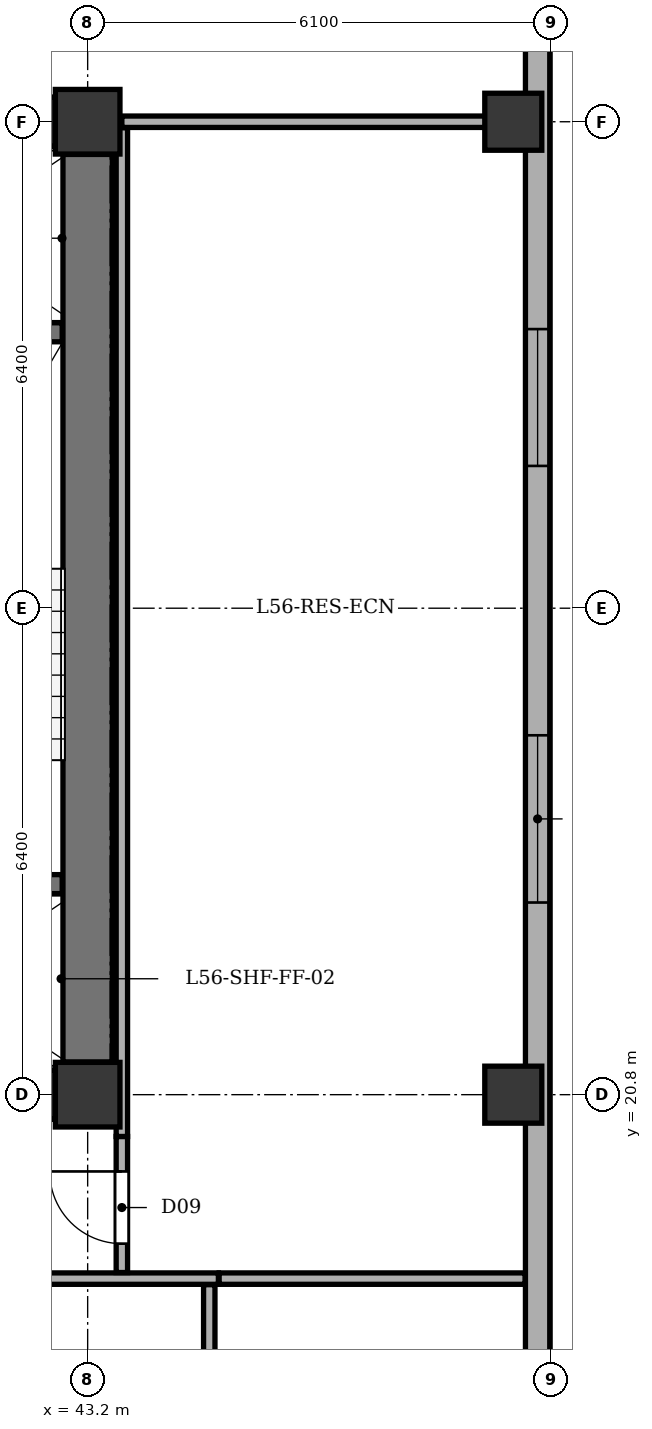
"""IFC4 building model, lengths in metres.
Left out: names, types, materials, properties, quantities, classifications, styles, units other than length and angle.
Written with IfcOpenShell. Run it as: python <this file> out.ifc"""

import sys

from ifc_helpers import new_model, si_unit, direction, frame, frame_2d, origin, origin_2d, place, context, subcontext, project, spatial, rectangle, extrude, element, fill, save


model = new_model("IFC4")
c1 = context("Model", 3, precision=1e-05, world=origin(), true_north=direction((0.0, 1.0)))
c2 = subcontext(c1, "Body", "Model", "MODEL_VIEW")
j1 = project(units=[si_unit("LENGTHUNIT", "METRE"), si_unit("PLANEANGLEUNIT", "RADIAN")], contexts=[c1])
p1 = place(None, origin())
s1 = spatial("IfcSite", under=j1, at=p1, CompositionType="ELEMENT")
p2 = place(p1, origin())
s2 = spatial("IfcBuilding", under=s1, at=p2, CompositionType="ELEMENT")
p3 = place(p2, frame((0.0, 0.0, 217.7)))
s3 = spatial("IfcBuildingStorey", under=s2, at=p3, CompositionType="ELEMENT", Elevation=217.7)
for number, where, z_axis, x_axis in (
    (1, (43.2, 20.8, 0.0), (0.0, 0.0, 1.0), (1.0, 0.0, 0.0)),
    (2, (43.2, 33.6, 0.0), (0.0, 0.0, 1.0), (1.0, 0.0, 0.0)),
):
    element("IfcColumn", number, at=place(p3, frame(where, z_axis=z_axis, x_axis=x_axis)), inside=s3, PredefinedType="COLUMN", context=c2, shape_type="SweptSolid", body=[
        extrude(rectangle(XDim=0.85, YDim=0.85, at=origin_2d()), origin(), (0.0, 0.0, 1.0), 3.4),
    ])
for number, where, z_axis, x_axis in (
    (3, (48.8, 20.8, 0.0), (0.0, 0.0, 1.0), (1.0, 0.0, 0.0)),
    (4, (48.8, 33.6, 0.0), (0.0, 0.0, 1.0), (1.0, 0.0, 0.0)),
):
    element("IfcColumn", number, at=place(p3, frame(where, z_axis=z_axis, x_axis=x_axis)), inside=s3, PredefinedType="COLUMN", context=c2, shape_type="SweptSolid", body=[
        extrude(rectangle(XDim=0.75, YDim=0.75, at=origin_2d()), origin(), (0.0, 0.0, 1.0), 3.4),
    ])
p4 = place(p3, frame((49.12, 35.0, 0.0), z_axis=(0.0, 0.0, 1.0), x_axis=(0.0, -1.0, 0.0)))
e5 = element("IfcWall", 5, at=p4, inside=s3, PredefinedType="STANDARD", context=c2, shape_type="SweptSolid", body=[
    extrude(rectangle(XDim=27.8, YDim=0.32, at=frame_2d((13.9, 0.0))), origin(), (0.0, 0.0, 1.0), 2.725),
])
p5 = place(p4, frame((4.128, 0.0, 0.75)))
e6 = element("IfcOpeningElement", 6, at=p5, cuts=e5, PredefinedType="OPENING", context=c2, shape_type="SweptSolid", body=[
    extrude(rectangle(XDim=1.8, YDim=1.7, at=frame_2d((0.9, 0.85))), frame((0.0, 0.17, 0.0), z_axis=(0.0, -1.0, 0.0), x_axis=(1.0, 0.0, 0.0)), (0.0, 0.0, 1.0), 0.34),
])
p6 = place(p4, frame((9.472, 0.0, 0.75)))
e7 = element("IfcOpeningElement", 7, at=p6, cuts=e5, PredefinedType="OPENING", context=c2, shape_type="SweptSolid", body=[
    extrude(rectangle(XDim=2.2, YDim=1.7, at=frame_2d((1.1, 0.85))), frame((0.0, 0.17, 0.0), z_axis=(0.0, -1.0, 0.0), x_axis=(1.0, 0.0, 0.0)), (0.0, 0.0, 1.0), 0.34),
])
p7 = place(p4, frame((18.815, 0.0, 0.75)))
e8 = element("IfcOpeningElement", 8, at=p7, cuts=e5, PredefinedType="OPENING", context=c2, shape_type="SweptSolid", body=[
    extrude(rectangle(XDim=1.8, YDim=1.7, at=frame_2d((0.9, 0.85))), frame((0.0, 0.17, 0.0), z_axis=(0.0, -1.0, 0.0), x_axis=(1.0, 0.0, 0.0)), (0.0, 0.0, 1.0), 0.34),
])
p8 = place(p4, frame((23.405, 0.0, 0.75)))
e9 = element("IfcOpeningElement", 9, at=p8, cuts=e5, PredefinedType="OPENING", context=c2, shape_type="SweptSolid", body=[
    extrude(rectangle(XDim=2.2, YDim=1.7, at=frame_2d((1.1, 0.85))), frame((0.0, 0.17, 0.0), z_axis=(0.0, -1.0, 0.0), x_axis=(1.0, 0.0, 0.0)), (0.0, 0.0, 1.0), 0.34),
])
p9 = place(p3, frame((43.2, 21.23, 0.0), z_axis=(0.0, 0.0, 1.0), x_axis=(0.0, 1.0, 0.0)))
e10 = element("IfcWall", 10, at=p9, inside=s3, PredefinedType="SHEAR", context=c2, shape_type="SweptSolid", body=[
    extrude(rectangle(XDim=11.94, YDim=0.65, at=frame_2d((5.97, 0.0))), origin(), (0.0, 0.0, 1.0), 3.1),
])
p10 = place(p3, frame((35.63, 20.8, 0.0), z_axis=(0.0, 0.0, 1.0), x_axis=(1.0, 0.0, 0.0)))
e11 = element("IfcWall", 11, at=p10, inside=s3, PredefinedType="SHEAR", context=c2, shape_type="SweptSolid", body=[
    extrude(rectangle(XDim=7.14, YDim=0.65, at=frame_2d((3.57, 0.0))), origin(), (0.0, 0.0, 1.0), 3.1),
])
p11 = place(p3, frame((35.63, 33.6, 0.0), z_axis=(0.0, 0.0, 1.0), x_axis=(1.0, 0.0, 0.0)))
e12 = element("IfcWall", 12, at=p11, inside=s3, PredefinedType="SHEAR", context=c2, shape_type="SweptSolid", body=[
    extrude(rectangle(XDim=7.14, YDim=0.65, at=frame_2d((3.57, 0.0))), origin(), (0.0, 0.0, 1.0), 3.1),
])
p12 = place(p11, frame((4.77, 0.0, 0.0)))
e13 = element("IfcOpeningElement", 13, at=p12, cuts=e12, PredefinedType="OPENING", context=c2, shape_type="SweptSolid", body=[
    extrude(rectangle(XDim=1.3, YDim=2.15, at=frame_2d((0.65, 1.075))), frame((0.0, 0.335, 0.0), z_axis=(0.0, -1.0, 0.0), x_axis=(1.0, 0.0, 0.0)), (0.0, 0.0, 1.0), 0.67),
])
p13 = place(p11, frame((2.57, 0.0, 0.0)))
e14 = element("IfcOpeningElement", 14, at=p13, cuts=e12, PredefinedType="OPENING", context=c2, shape_type="SweptSolid", body=[
    extrude(rectangle(XDim=0.85, YDim=2.02, at=frame_2d((0.425, 1.01))), frame((0.0, 0.335, 0.0), z_axis=(0.0, -1.0, 0.0), x_axis=(1.0, 0.0, 0.0)), (0.0, 0.0, 1.0), 0.67),
])
for number, where, z_axis, x_axis in (
    (15, (39.69, 23.57, 0.0), (0.0, 0.0, 1.0), (1.0, 0.0, 0.0)),
    (16, (39.69, 30.83, 0.0), (0.0, 0.0, 1.0), (1.0, 0.0, 0.0)),
):
    element("IfcWall", number, at=place(p3, frame(where, z_axis=z_axis, x_axis=x_axis)), inside=s3, PredefinedType="SHEAR", context=c2, shape_type="SweptSolid", body=[
        extrude(rectangle(XDim=3.175, YDim=0.25, at=frame_2d((1.587, 0.0))), origin(), (0.0, 0.0, 1.0), 3.1),
    ])
p14 = place(p3, frame((10.9, 18.38, 0.0), z_axis=(0.0, 0.0, 1.0), x_axis=(1.0, 0.0, 0.0)))
e17 = element("IfcWall", 17, at=p14, inside=s3, PredefinedType="PARTITIONING", context=c2, shape_type="SweptSolid", body=[
    extrude(rectangle(XDim=34.02, YDim=0.15, at=frame_2d((17.01, 0.0))), origin(), (0.0, 0.0, 1.0), 3.1),
])
p15 = place(p14, frame((3.674, 0.0, 0.0)))
e18 = element("IfcOpeningElement", 18, at=p15, cuts=e17, PredefinedType="OPENING", context=c2, shape_type="SweptSolid", body=[
    extrude(rectangle(XDim=1.0, YDim=2.1, at=frame_2d((0.5, 1.05))), frame((0.0, 0.085, 0.0), z_axis=(0.0, -1.0, 0.0), x_axis=(1.0, 0.0, 0.0)), (0.0, 0.0, 1.0), 0.17),
])
p16 = place(p14, frame((12.118, 0.0, 0.0)))
e19 = element("IfcOpeningElement", 19, at=p16, cuts=e17, PredefinedType="OPENING", context=c2, shape_type="SweptSolid", body=[
    extrude(rectangle(XDim=1.0, YDim=2.1, at=frame_2d((0.5, 1.05))), frame((0.0, 0.085, 0.0), z_axis=(0.0, -1.0, 0.0), x_axis=(1.0, 0.0, 0.0)), (0.0, 0.0, 1.0), 0.17),
])
p17 = place(p14, frame((20.901, 0.0, 0.0)))
e20 = element("IfcOpeningElement", 20, at=p17, cuts=e17, PredefinedType="OPENING", context=c2, shape_type="SweptSolid", body=[
    extrude(rectangle(XDim=1.0, YDim=2.1, at=frame_2d((0.5, 1.05))), frame((0.0, 0.085, 0.0), z_axis=(0.0, -1.0, 0.0), x_axis=(1.0, 0.0, 0.0)), (0.0, 0.0, 1.0), 0.17),
])
p18 = place(p14, frame((29.346, 0.0, 0.0)))
e21 = element("IfcOpeningElement", 21, at=p18, cuts=e17, PredefinedType="OPENING", context=c2, shape_type="SweptSolid", body=[
    extrude(rectangle(XDim=1.0, YDim=2.1, at=frame_2d((0.5, 1.05))), frame((0.0, 0.085, 0.0), z_axis=(0.0, -1.0, 0.0), x_axis=(1.0, 0.0, 0.0)), (0.0, 0.0, 1.0), 0.17),
])
p19 = place(p3, frame((44.8, 3.045, 0.0), z_axis=(0.0, 0.0, 1.0), x_axis=(0.0, 1.0, 0.0)))
e22 = element("IfcWall", 22, at=p19, inside=s3, PredefinedType="PARTITIONING", context=c2, shape_type="SweptSolid", body=[
    extrude(rectangle(XDim=15.255, YDim=0.15, at=frame_2d((7.627, 0.0))), origin(), (0.0, 0.0, 1.0), 3.1),
])
p20 = place(p3, frame((44.93, 18.38, 0.0), z_axis=(0.0, 0.0, 1.0), x_axis=(1.0, 0.0, 0.0)))
e23 = element("IfcWall", 23, at=p20, inside=s3, PredefinedType="PARTITIONING", context=c2, shape_type="SweptSolid", body=[
    extrude(rectangle(XDim=4.025, YDim=0.15, at=frame_2d((2.013, 0.0))), origin(), (0.0, 0.0, 1.0), 3.1),
])
p21 = place(p3, frame((43.65, 33.6, 0.0), z_axis=(0.0, 0.0, 1.0), x_axis=(1.0, 0.0, 0.0)))
e24 = element("IfcWall", 24, at=p21, inside=s3, PredefinedType="PARTITIONING", context=c2, shape_type="SweptSolid", body=[
    extrude(rectangle(XDim=5.305, YDim=0.15, at=frame_2d((2.653, 0.0))), origin(), (0.0, 0.0, 1.0), 2.535),
])
p22 = place(p3, frame((43.65, 18.46, 0.0), z_axis=(0.0, 0.0, 1.0), x_axis=(0.0, 1.0, 0.0)))
e25 = element("IfcWall", 25, at=p22, inside=s3, PredefinedType="PARTITIONING", context=c2, shape_type="SweptSolid", body=[
    extrude(rectangle(XDim=1.79, YDim=0.15, at=frame_2d((0.895, 0.0))), origin(), (0.0, 0.0, 1.0), 3.1),
])
p23 = place(p22, frame((0.38, 0.0, 0.0)))
e26 = element("IfcOpeningElement", 26, at=p23, cuts=e25, PredefinedType="OPENING", context=c2, shape_type="SweptSolid", body=[
    extrude(rectangle(XDim=0.95, YDim=2.1, at=frame_2d((0.475, 1.05))), frame((0.0, 0.085, 0.0), z_axis=(0.0, -1.0, 0.0), x_axis=(1.0, 0.0, 0.0)), (0.0, 0.0, 1.0), 0.17),
])
p24 = place(p3, frame((43.65, 20.25, 0.0), z_axis=(0.0, 0.0, 1.0), x_axis=(0.0, 1.0, 0.0)))
e27 = element("IfcWall", 27, at=p24, inside=s3, PredefinedType="PARTITIONING", context=c2, shape_type="SweptSolid", body=[
    extrude(rectangle(XDim=13.27, YDim=0.15, at=frame_2d((6.635, 0.0))), origin(), (0.0, 0.0, 1.0), 3.1),
])
p25 = place(p5, origin())
e28 = element("IfcWindow", 28, at=p25, inside=s3, PartitioningType="SINGLE_PANEL", PredefinedType="WINDOW", context=c2, shape_type="SweptSolid", body=[
    extrude(rectangle(XDim=1.8, YDim=1.7, at=frame_2d((0.9, 0.85))), frame((0.0, -0.01, 0.0), z_axis=(0.0, -1.0, 0.0), x_axis=(1.0, 0.0, 0.0)), (0.0, 0.0, 1.0), 0.06),
])
fill(e6, e28)
p26 = place(p6, origin())
e29 = element("IfcWindow", 29, at=p26, inside=s3, PartitioningType="SINGLE_PANEL", PredefinedType="WINDOW", context=c2, shape_type="SweptSolid", body=[
    extrude(rectangle(XDim=2.2, YDim=1.7, at=frame_2d((1.1, 0.85))), frame((0.0, -0.01, 0.0), z_axis=(0.0, -1.0, 0.0), x_axis=(1.0, 0.0, 0.0)), (0.0, 0.0, 1.0), 0.06),
])
fill(e7, e29)
p27 = place(p23, origin())
e30 = element("IfcDoor", 30, at=p27, inside=s3, OperationType="SINGLE_SWING_RIGHT", PredefinedType="DOOR", context=c2, shape_type="SweptSolid", body=[
    extrude(rectangle(XDim=0.95, YDim=2.1, at=frame_2d((0.475, 1.05))), frame((0.0, 0.025, 0.0), z_axis=(0.0, -1.0, 0.0), x_axis=(1.0, 0.0, 0.0)), (0.0, 0.0, 1.0), 0.05),
])
fill(e26, e30)
save(model, sys.argv[1])
